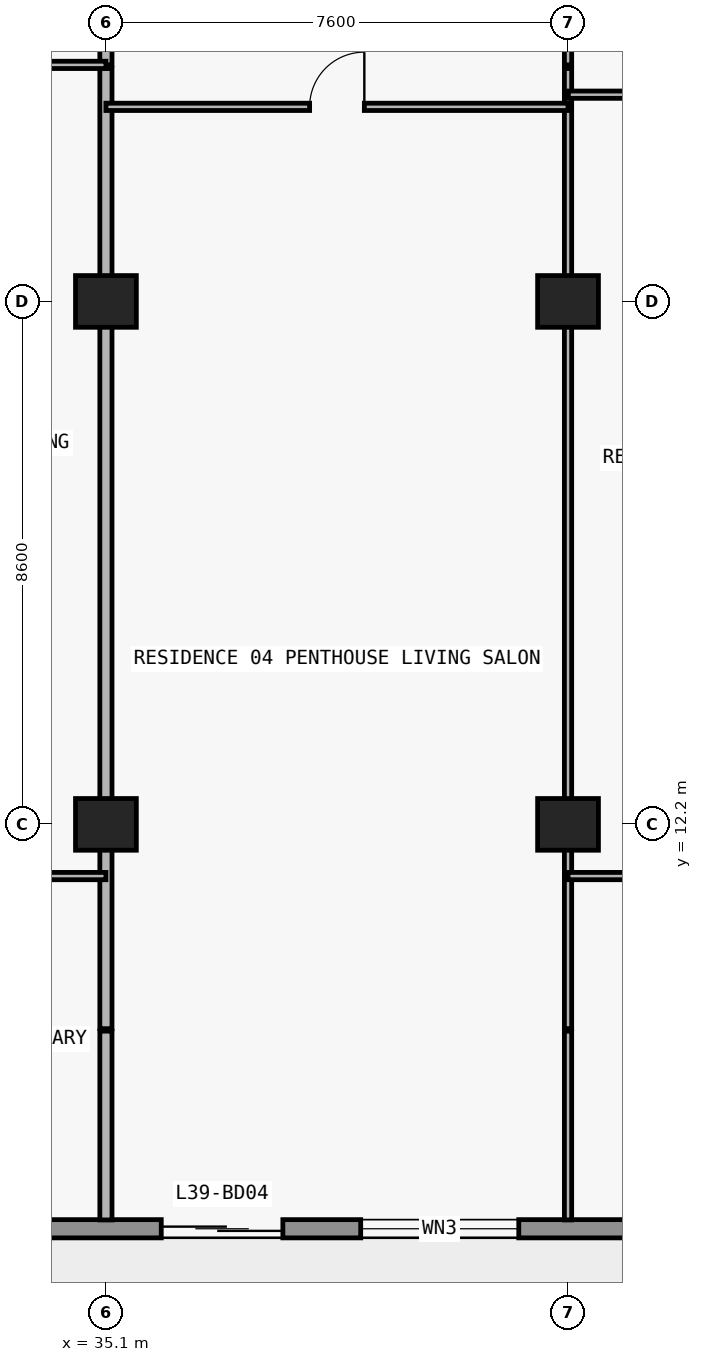
"""IFC4 building model, lengths in metres.
Left out: names, types, materials, properties, quantities, classifications, styles, units other than length and angle.
Written with IfcOpenShell. Run it as: python <this file> out.ifc"""

import sys

from ifc_helpers import new_model, si_unit, direction, frame, frame_2d, origin, origin_2d, place, context, subcontext, project, spatial, rectangle, extrude, element, fill, save


model = new_model("IFC4")
c1 = context("Model", 3, precision=1e-05, world=origin(), true_north=direction((0.0, 1.0)))
c2 = subcontext(c1, "Body", "Model", "MODEL_VIEW")
j1 = project(units=[si_unit("LENGTHUNIT", "METRE"), si_unit("PLANEANGLEUNIT", "RADIAN")], contexts=[c1])
p1 = place(None, origin())
s1 = spatial("IfcSite", under=j1, at=p1, CompositionType="ELEMENT")
p2 = place(p1, origin())
s2 = spatial("IfcBuilding", under=s1, at=p2, CompositionType="ELEMENT")
p3 = place(p2, frame((0.0, 0.0, 142.2)))
s3 = spatial("IfcBuildingStorey", under=s2, at=p3, CompositionType="ELEMENT", Elevation=142.2)
for number, where, z_axis, x_axis in (
    (1, (35.1, 12.2, 0.0), (0.0, 0.0, 1.0), (1.0, 0.0, 0.0)),
    (2, (42.7, 12.2, 0.0), (0.0, 0.0, 1.0), (1.0, 0.0, 0.0)),
    (3, (35.1, 20.8, 0.0), (0.0, 0.0, 1.0), (1.0, 0.0, 0.0)),
    (4, (42.7, 20.8, 0.0), (0.0, 0.0, 1.0), (1.0, 0.0, 0.0)),
):
    element("IfcColumn", number, at=place(p3, frame(where, z_axis=z_axis, x_axis=x_axis)), inside=s3, PredefinedType="COLUMN", context=c2, shape_type="SweptSolid", body=[
        extrude(rectangle(XDim=1.0, YDim=0.85, at=origin_2d()), origin(), (0.0, 0.0, 1.0), 3.05),
    ])
p4 = place(p3, frame((70.1, 5.55, 0.0), z_axis=(0.0, 0.0, 1.0), x_axis=(-1.0, 0.0, 0.0)))
e5 = element("IfcWall", 5, at=p4, inside=s3, PredefinedType="STANDARD", context=c2, shape_type="SweptSolid", body=[
    extrude(rectangle(XDim=62.4, YDim=0.3, at=frame_2d((31.2, 0.0))), origin(), (0.0, 0.0, 1.0), 3.05),
])
p5 = place(p4, frame((57.226, 0.0, 0.0)))
e6 = element("IfcOpeningElement", 6, at=p5, cuts=e5, PredefinedType="OPENING", context=c2, shape_type="SweptSolid", body=[
    extrude(rectangle(XDim=2.0, YDim=2.3, at=frame_2d((1.0, 1.15))), frame((0.0, 0.16, 0.0), z_axis=(0.0, -1.0, 0.0), x_axis=(1.0, 0.0, 0.0)), (0.0, 0.0, 1.0), 0.32),
])
p6 = place(p4, frame((52.926, 0.0, 0.85)))
e7 = element("IfcOpeningElement", 7, at=p6, cuts=e5, PredefinedType="OPENING", context=c2, shape_type="SweptSolid", body=[
    extrude(rectangle(XDim=2.2, YDim=1.55, at=frame_2d((1.1, 0.775))), frame((0.0, 0.16, 0.0), z_axis=(0.0, -1.0, 0.0), x_axis=(1.0, 0.0, 0.0)), (0.0, 0.0, 1.0), 0.32),
])
p7 = place(p4, frame((48.49, 0.0, 0.0)))
e8 = element("IfcOpeningElement", 8, at=p7, cuts=e5, PredefinedType="OPENING", context=c2, shape_type="SweptSolid", body=[
    extrude(rectangle(XDim=2.0, YDim=2.3, at=frame_2d((1.0, 1.15))), frame((0.0, 0.16, 0.0), z_axis=(0.0, -1.0, 0.0), x_axis=(1.0, 0.0, 0.0)), (0.0, 0.0, 1.0), 0.32),
])
p8 = place(p4, frame((44.39, 0.0, 0.85)))
e9 = element("IfcOpeningElement", 9, at=p8, cuts=e5, PredefinedType="OPENING", context=c2, shape_type="SweptSolid", body=[
    extrude(rectangle(XDim=1.8, YDim=1.55, at=frame_2d((0.9, 0.775))), frame((0.0, 0.16, 0.0), z_axis=(0.0, -1.0, 0.0), x_axis=(1.0, 0.0, 0.0)), (0.0, 0.0, 1.0), 0.32),
])
p9 = place(p4, frame((40.426, 0.0, 0.0)))
e10 = element("IfcOpeningElement", 10, at=p9, cuts=e5, PredefinedType="OPENING", context=c2, shape_type="SweptSolid", body=[
    extrude(rectangle(XDim=2.0, YDim=2.3, at=frame_2d((1.0, 1.15))), frame((0.0, 0.16, 0.0), z_axis=(0.0, -1.0, 0.0), x_axis=(1.0, 0.0, 0.0)), (0.0, 0.0, 1.0), 0.32),
])
p10 = place(p4, frame((36.126, 0.0, 0.85)))
e11 = element("IfcOpeningElement", 11, at=p10, cuts=e5, PredefinedType="OPENING", context=c2, shape_type="SweptSolid", body=[
    extrude(rectangle(XDim=2.2, YDim=1.55, at=frame_2d((1.1, 0.775))), frame((0.0, 0.16, 0.0), z_axis=(0.0, -1.0, 0.0), x_axis=(1.0, 0.0, 0.0)), (0.0, 0.0, 1.0), 0.32),
])
p11 = place(p4, frame((32.09, 0.0, 0.0)))
e12 = element("IfcOpeningElement", 12, at=p11, cuts=e5, PredefinedType="OPENING", context=c2, shape_type="SweptSolid", body=[
    extrude(rectangle(XDim=2.0, YDim=2.3, at=frame_2d((1.0, 1.15))), frame((0.0, 0.16, 0.0), z_axis=(0.0, -1.0, 0.0), x_axis=(1.0, 0.0, 0.0)), (0.0, 0.0, 1.0), 0.32),
])
p12 = place(p4, frame((28.21, 0.0, 0.65)))
e13 = element("IfcOpeningElement", 13, at=p12, cuts=e5, PredefinedType="OPENING", context=c2, shape_type="SweptSolid", body=[
    extrude(rectangle(XDim=2.6, YDim=1.85, at=frame_2d((1.3, 0.925))), frame((0.0, 0.16, 0.0), z_axis=(0.0, -1.0, 0.0), x_axis=(1.0, 0.0, 0.0)), (0.0, 0.0, 1.0), 0.32),
])
p13 = place(p4, frame((22.1, 0.0, 0.85)))
e14 = element("IfcOpeningElement", 14, at=p13, cuts=e5, PredefinedType="OPENING", context=c2, shape_type="SweptSolid", body=[
    extrude(rectangle(XDim=2.2, YDim=1.55, at=frame_2d((1.1, 0.775))), frame((0.0, 0.16, 0.0), z_axis=(0.0, -1.0, 0.0), x_axis=(1.0, 0.0, 0.0)), (0.0, 0.0, 1.0), 0.32),
])
p14 = place(p4, frame((16.09, 0.0, 0.0)))
e15 = element("IfcOpeningElement", 15, at=p14, cuts=e5, PredefinedType="OPENING", context=c2, shape_type="SweptSolid", body=[
    extrude(rectangle(XDim=2.0, YDim=2.3, at=frame_2d((1.0, 1.15))), frame((0.0, 0.16, 0.0), z_axis=(0.0, -1.0, 0.0), x_axis=(1.0, 0.0, 0.0)), (0.0, 0.0, 1.0), 0.32),
])
p15 = place(p4, frame((11.41, 0.0, 0.65)))
e16 = element("IfcOpeningElement", 16, at=p15, cuts=e5, PredefinedType="OPENING", context=c2, shape_type="SweptSolid", body=[
    extrude(rectangle(XDim=2.6, YDim=1.85, at=frame_2d((1.3, 0.925))), frame((0.0, 0.16, 0.0), z_axis=(0.0, -1.0, 0.0), x_axis=(1.0, 0.0, 0.0)), (0.0, 0.0, 1.0), 0.32),
])
p16 = place(p4, frame((5.3, 0.0, 0.85)))
e17 = element("IfcOpeningElement", 17, at=p16, cuts=e5, PredefinedType="OPENING", context=c2, shape_type="SweptSolid", body=[
    extrude(rectangle(XDim=2.2, YDim=1.55, at=frame_2d((1.1, 0.775))), frame((0.0, 0.16, 0.0), z_axis=(0.0, -1.0, 0.0), x_axis=(1.0, 0.0, 0.0)), (0.0, 0.0, 1.0), 0.32),
])
p17 = place(p3, frame((35.1, 5.695, 0.0), z_axis=(0.0, 0.0, 1.0), x_axis=(0.0, 1.0, 0.0)))
e18 = element("IfcWall", 18, at=p17, inside=s3, PredefinedType="PARTITIONING", context=c2, shape_type="SweptSolid", body=[
    extrude(rectangle(XDim=3.105, YDim=0.2, at=frame_2d((1.552, 0.0))), origin(), (0.0, 0.0, 1.0), 3.05),
])
p18 = place(p3, frame((35.1, 8.84, 0.0), z_axis=(0.0, 0.0, 1.0), x_axis=(0.0, 1.0, 0.0)))
e19 = element("IfcWall", 19, at=p18, inside=s3, PredefinedType="PARTITIONING", context=c2, shape_type="SweptSolid", body=[
    extrude(rectangle(XDim=15.79, YDim=0.2, at=frame_2d((7.895, 0.0))), origin(), (0.0, 0.0, 1.0), 2.174),
])
p19 = place(p3, frame((35.1, 24.69, 0.0), z_axis=(0.0, 0.0, 1.0), x_axis=(0.0, 1.0, 0.0)))
e20 = element("IfcWall", 20, at=p19, inside=s3, PredefinedType="PARTITIONING", context=c2, shape_type="SweptSolid", body=[
    extrude(rectangle(XDim=5.09, YDim=0.2, at=frame_2d((2.545, 0.0))), origin(), (0.0, 0.0, 1.0), 2.174),
])
p20 = place(p3, frame((42.7, 5.695, 0.0), z_axis=(0.0, 0.0, 1.0), x_axis=(0.0, 1.0, 0.0)))
e21 = element("IfcWall", 21, at=p20, inside=s3, PredefinedType="PARTITIONING", context=c2, shape_type="SweptSolid", body=[
    extrude(rectangle(XDim=3.105, YDim=0.12, at=frame_2d((1.552, 0.0))), origin(), (0.0, 0.0, 1.0), 3.05),
])
p21 = place(p3, frame((42.7, 8.84, 0.0), z_axis=(0.0, 0.0, 1.0), x_axis=(0.0, 1.0, 0.0)))
e22 = element("IfcWall", 22, at=p21, inside=s3, PredefinedType="PARTITIONING", context=c2, shape_type="SweptSolid", body=[
    extrude(rectangle(XDim=15.79, YDim=0.12, at=frame_2d((7.895, 0.0))), origin(), (0.0, 0.0, 1.0), 2.174),
])
p22 = place(p3, frame((42.7, 24.69, 0.0), z_axis=(0.0, 0.0, 1.0), x_axis=(0.0, 1.0, 0.0)))
e23 = element("IfcWall", 23, at=p22, inside=s3, PredefinedType="PARTITIONING", context=c2, shape_type="SweptSolid", body=[
    extrude(rectangle(XDim=5.09, YDim=0.12, at=frame_2d((2.545, 0.0))), origin(), (0.0, 0.0, 1.0), 2.174),
])
p23 = place(p22, frame((1.505, 0.0, 0.0)))
e24 = element("IfcOpeningElement", 24, at=p23, cuts=e23, PredefinedType="OPENING", context=c2, shape_type="SweptSolid", body=[
    extrude(rectangle(XDim=0.9, YDim=2.124, at=frame_2d((0.45, 1.062))), frame((0.0, 0.07, 0.0), z_axis=(0.0, -1.0, 0.0), x_axis=(1.0, 0.0, 0.0)), (0.0, 0.0, 1.0), 0.14),
])
p24 = place(p3, frame((30.648, 11.35, 0.0), z_axis=(0.0, 0.0, 1.0), x_axis=(1.0, 0.0, 0.0)))
e25 = element("IfcWall", 25, at=p24, inside=s3, PredefinedType="PARTITIONING", context=c2, shape_type="SweptSolid", body=[
    extrude(rectangle(XDim=4.452, YDim=0.12, at=frame_2d((2.226, 0.0))), origin(), (0.0, 0.0, 1.0), 3.05),
])
p25 = place(p24, frame((1.776, 0.0, 0.0)))
e26 = element("IfcOpeningElement", 26, at=p25, cuts=e25, PredefinedType="OPENING", context=c2, shape_type="SweptSolid", body=[
    extrude(rectangle(XDim=0.9, YDim=2.15, at=frame_2d((0.45, 1.075))), frame((0.0, 0.07, 0.0), z_axis=(0.0, -1.0, 0.0), x_axis=(1.0, 0.0, 0.0)), (0.0, 0.0, 1.0), 0.14),
])
p26 = place(p3, frame((42.7, 11.35, 0.0), z_axis=(0.0, 0.0, 1.0), x_axis=(1.0, 0.0, 0.0)))
e27 = element("IfcWall", 27, at=p26, inside=s3, PredefinedType="PARTITIONING", context=c2, shape_type="SweptSolid", body=[
    extrude(rectangle(XDim=8.4, YDim=0.12, at=frame_2d((4.2, 0.0))), origin(), (0.0, 0.0, 1.0), 3.05),
])
p27 = place(p26, frame((3.75, 0.0, 0.0)))
e28 = element("IfcOpeningElement", 28, at=p27, cuts=e27, PredefinedType="OPENING", context=c2, shape_type="SweptSolid", body=[
    extrude(rectangle(XDim=0.9, YDim=2.15, at=frame_2d((0.45, 1.075))), frame((0.0, 0.07, 0.0), z_axis=(0.0, -1.0, 0.0), x_axis=(1.0, 0.0, 0.0)), (0.0, 0.0, 1.0), 0.14),
])
p28 = place(p3, frame((35.1, 24.0, 0.0), z_axis=(0.0, 0.0, 1.0), x_axis=(1.0, 0.0, 0.0)))
e29 = element("IfcWall", 29, at=p28, inside=s3, PredefinedType="PARTITIONING", context=c2, shape_type="SweptSolid", body=[
    extrude(rectangle(XDim=7.6, YDim=0.12, at=frame_2d((3.8, 0.0))), origin(), (0.0, 0.0, 1.0), 3.05),
])
p29 = place(p28, frame((3.35, 0.0, 0.0)))
e30 = element("IfcOpeningElement", 30, at=p29, cuts=e29, PredefinedType="OPENING", context=c2, shape_type="SweptSolid", body=[
    extrude(rectangle(XDim=0.9, YDim=2.15, at=frame_2d((0.45, 1.075))), frame((0.0, 0.07, 0.0), z_axis=(0.0, -1.0, 0.0), x_axis=(1.0, 0.0, 0.0)), (0.0, 0.0, 1.0), 0.14),
])
p30 = place(p3, frame((42.705, 24.2, 0.0), z_axis=(0.0, 0.0, 1.0), x_axis=(1.0, 0.0, 0.0)))
e31 = element("IfcWall", 31, at=p30, inside=s3, PredefinedType="PARTITIONING", context=c2, shape_type="SweptSolid", body=[
    extrude(rectangle(XDim=8.175, YDim=0.12, at=frame_2d((4.087, 0.0))), origin(), (0.0, 0.0, 1.0), 3.05),
])
p31 = place(p30, frame((3.637, 0.0, 0.0)))
e32 = element("IfcOpeningElement", 32, at=p31, cuts=e31, PredefinedType="OPENING", context=c2, shape_type="SweptSolid", body=[
    extrude(rectangle(XDim=0.9, YDim=2.15, at=frame_2d((0.45, 1.075))), frame((0.0, 0.07, 0.0), z_axis=(0.0, -1.0, 0.0), x_axis=(1.0, 0.0, 0.0)), (0.0, 0.0, 1.0), 0.14),
])
p32 = place(p3, frame((26.92, 24.69, 0.0), z_axis=(0.0, 0.0, 1.0), x_axis=(1.0, 0.0, 0.0)))
e33 = element("IfcWall", 33, at=p32, inside=s3, PredefinedType="PARTITIONING", context=c2, shape_type="SweptSolid", body=[
    extrude(rectangle(XDim=8.18, YDim=0.12, at=frame_2d((4.09, 0.0))), origin(), (0.0, 0.0, 1.0), 3.05),
])
p33 = place(p32, frame((1.414, 0.0, 0.0)))
e34 = element("IfcOpeningElement", 34, at=p33, cuts=e33, PredefinedType="OPENING", context=c2, shape_type="SweptSolid", body=[
    extrude(rectangle(XDim=0.9, YDim=2.15, at=frame_2d((0.45, 1.075))), frame((0.0, 0.07, 0.0), z_axis=(0.0, -1.0, 0.0), x_axis=(1.0, 0.0, 0.0)), (0.0, 0.0, 1.0), 0.14),
])
p34 = place(p32, frame((5.673, 0.0, 0.0)))
e35 = element("IfcOpeningElement", 35, at=p34, cuts=e33, PredefinedType="OPENING", context=c2, shape_type="SweptSolid", body=[
    extrude(rectangle(XDim=0.9, YDim=2.15, at=frame_2d((0.45, 1.075))), frame((0.0, 0.07, 0.0), z_axis=(0.0, -1.0, 0.0), x_axis=(1.0, 0.0, 0.0)), (0.0, 0.0, 1.0), 0.14),
])
p35 = place(p11, origin())
e36 = element("IfcDoor", 36, at=p35, inside=s3, OperationType="DOUBLE_DOOR_SLIDING", PredefinedType="DOOR", context=c2, shape_type="SweptSolid", body=[
    extrude(rectangle(XDim=2.0, YDim=2.3, at=frame_2d((1.0, 1.15))), frame((0.0, 0.025, 0.0), z_axis=(0.0, -1.0, 0.0), x_axis=(1.0, 0.0, 0.0)), (0.0, 0.0, 1.0), 0.05),
])
fill(e12, e36)
p36 = place(p12, origin())
e37 = element("IfcWindow", 37, at=p36, inside=s3, PartitioningType="SINGLE_PANEL", PredefinedType="WINDOW", context=c2, shape_type="SweptSolid", body=[
    extrude(rectangle(XDim=2.6, YDim=1.85, at=frame_2d((1.3, 0.925))), frame((0.0, 0.03, 0.0), z_axis=(0.0, -1.0, 0.0), x_axis=(1.0, 0.0, 0.0)), (0.0, 0.0, 1.0), 0.06),
])
fill(e13, e37)
p37 = place(p29, origin())
e38 = element("IfcDoor", 38, at=p37, inside=s3, OperationType="SINGLE_SWING_RIGHT", PredefinedType="DOOR", context=c2, shape_type="SweptSolid", body=[
    extrude(rectangle(XDim=0.9, YDim=2.15, at=frame_2d((0.45, 1.075))), frame((0.0, 0.025, 0.0), z_axis=(0.0, -1.0, 0.0), x_axis=(1.0, 0.0, 0.0)), (0.0, 0.0, 1.0), 0.05),
])
fill(e30, e38)
save(model, sys.argv[1])
